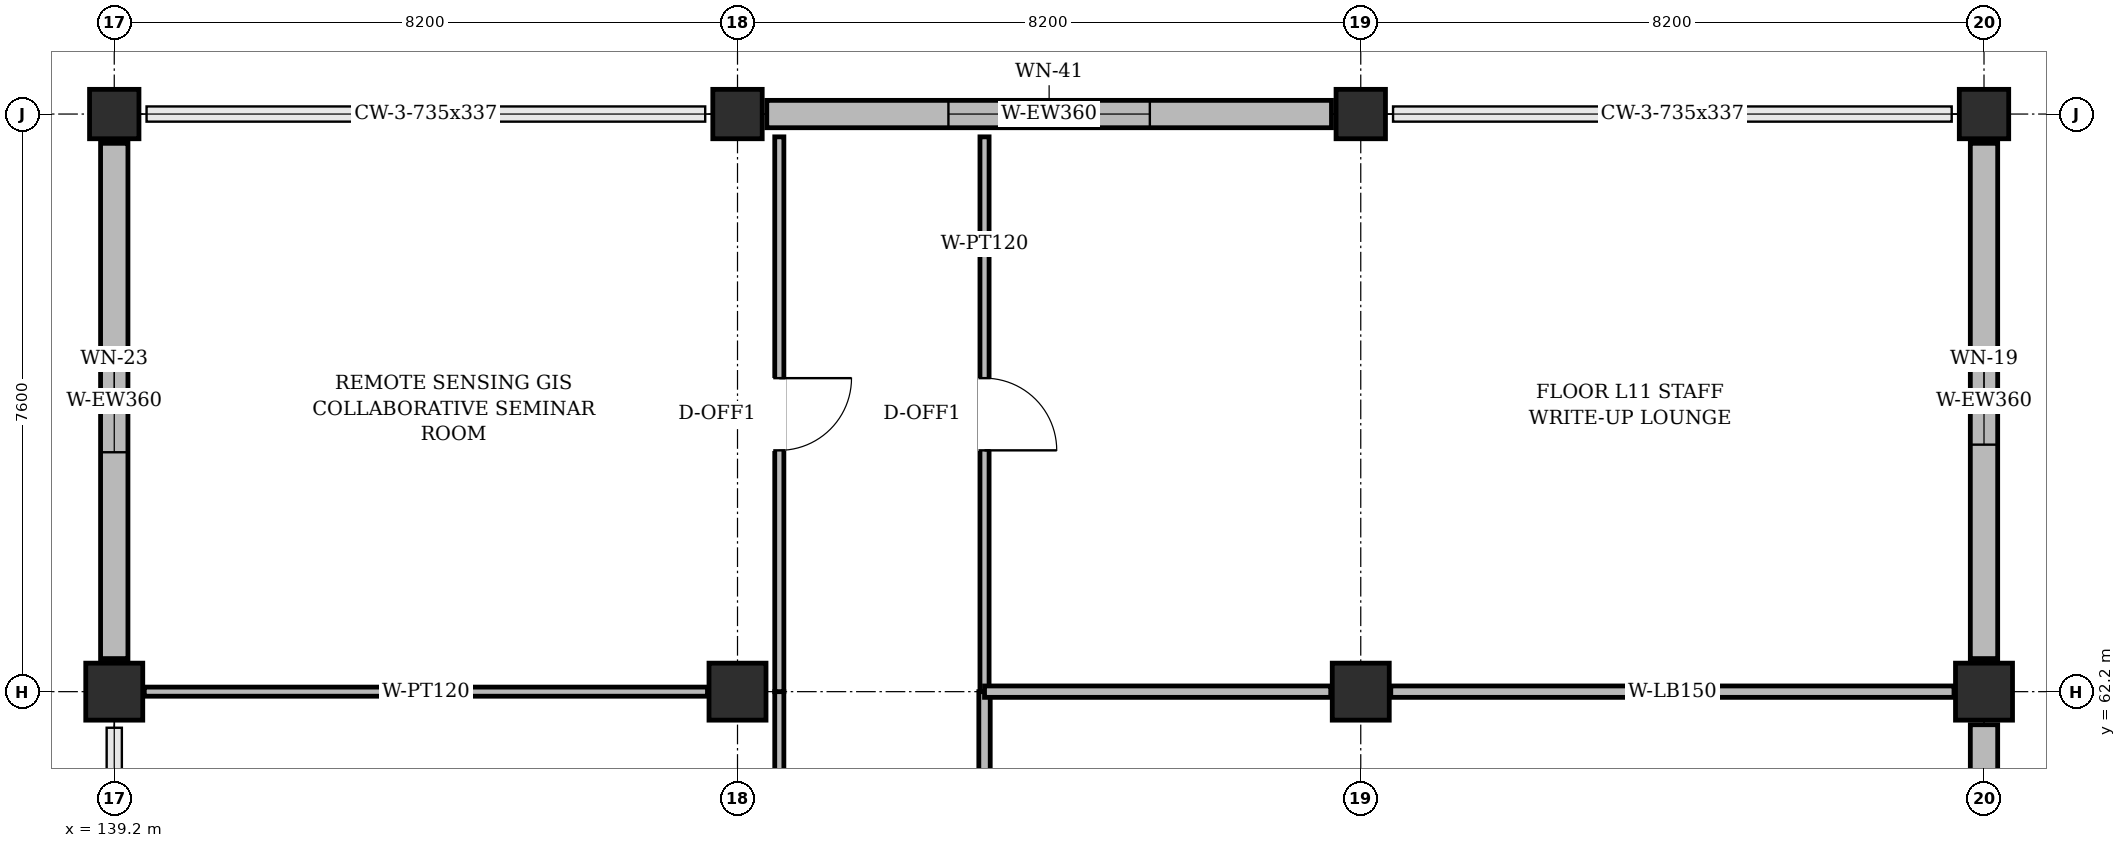
"""IFC4 building model, lengths in metres.
Left out: names, types, materials, properties, quantities, classifications, styles, units other than length and angle.
Written with IfcOpenShell. Run it as: python <this file> out.ifc"""

import sys

from ifc_helpers import new_model, si_unit, direction, frame, frame_2d, origin, origin_2d, place, context, subcontext, project, spatial, rectangle, extrude, element, fill, save


model = new_model("IFC4")
c1 = context("Model", 3, precision=1e-05, world=origin(), true_north=direction((0.0, 1.0)))
c2 = subcontext(c1, "Body", "Model", "MODEL_VIEW")
j1 = project(units=[si_unit("LENGTHUNIT", "METRE"), si_unit("PLANEANGLEUNIT", "RADIAN")], contexts=[c1])
p1 = place(None, origin())
s1 = spatial("IfcSite", under=j1, at=p1, CompositionType="ELEMENT")
p2 = place(p1, origin())
s2 = spatial("IfcBuilding", under=s1, at=p2, CompositionType="ELEMENT")
p3 = place(p2, frame((0.0, 0.0, 49.2)))
s3 = spatial("IfcBuildingStorey", under=s2, at=p3, CompositionType="ELEMENT", Elevation=49.2)
p4 = place(p3, frame((139.2, 62.2, 0.0), z_axis=(0.0, 0.0, 1.0), x_axis=(1.0, 0.0, 0.0)))
e1 = element("IfcColumn", 1, at=p4, inside=s3, PredefinedType="COLUMN", context=c2, shape_type="SweptSolid", body=[
    extrude(rectangle(XDim=0.75, YDim=0.75, at=origin_2d()), origin(), (0.0, 0.0, 1.0), 3.97),
])
p5 = place(p3, frame((139.2, 69.8, 0.0), z_axis=(0.0, 0.0, 1.0), x_axis=(1.0, 0.0, 0.0)))
e2 = element("IfcColumn", 2, at=p5, inside=s3, PredefinedType="COLUMN", context=c2, shape_type="SweptSolid", body=[
    extrude(rectangle(XDim=0.65, YDim=0.65, at=origin_2d()), origin(), (0.0, 0.0, 1.0), 3.97),
])
p6 = place(p3, frame((147.4, 62.2, 0.0), z_axis=(0.0, 0.0, 1.0), x_axis=(1.0, 0.0, 0.0)))
e3 = element("IfcColumn", 3, at=p6, inside=s3, PredefinedType="COLUMN", context=c2, shape_type="SweptSolid", body=[
    extrude(rectangle(XDim=0.75, YDim=0.75, at=origin_2d()), origin(), (0.0, 0.0, 1.0), 3.97),
])
p7 = place(p3, frame((147.4, 69.8, 0.0), z_axis=(0.0, 0.0, 1.0), x_axis=(1.0, 0.0, 0.0)))
e4 = element("IfcColumn", 4, at=p7, inside=s3, PredefinedType="COLUMN", context=c2, shape_type="SweptSolid", body=[
    extrude(rectangle(XDim=0.65, YDim=0.65, at=origin_2d()), origin(), (0.0, 0.0, 1.0), 3.97),
])
p8 = place(p3, frame((155.6, 62.2, 0.0), z_axis=(0.0, 0.0, 1.0), x_axis=(1.0, 0.0, 0.0)))
e5 = element("IfcColumn", 5, at=p8, inside=s3, PredefinedType="COLUMN", context=c2, shape_type="SweptSolid", body=[
    extrude(rectangle(XDim=0.75, YDim=0.75, at=origin_2d()), origin(), (0.0, 0.0, 1.0), 3.97),
])
p9 = place(p3, frame((155.6, 69.8, 0.0), z_axis=(0.0, 0.0, 1.0), x_axis=(1.0, 0.0, 0.0)))
e6 = element("IfcColumn", 6, at=p9, inside=s3, PredefinedType="COLUMN", context=c2, shape_type="SweptSolid", body=[
    extrude(rectangle(XDim=0.65, YDim=0.65, at=origin_2d()), origin(), (0.0, 0.0, 1.0), 3.97),
])
p10 = place(p3, frame((163.8, 62.2, 0.0), z_axis=(0.0, 0.0, 1.0), x_axis=(1.0, 0.0, 0.0)))
e7 = element("IfcColumn", 7, at=p10, inside=s3, PredefinedType="COLUMN", context=c2, shape_type="SweptSolid", body=[
    extrude(rectangle(XDim=0.75, YDim=0.75, at=origin_2d()), origin(), (0.0, 0.0, 1.0), 3.97),
])
p11 = place(p3, frame((163.8, 69.8, 0.0), z_axis=(0.0, 0.0, 1.0), x_axis=(1.0, 0.0, 0.0)))
e8 = element("IfcColumn", 8, at=p11, inside=s3, PredefinedType="COLUMN", context=c2, shape_type="SweptSolid", body=[
    extrude(rectangle(XDim=0.65, YDim=0.65, at=origin_2d()), origin(), (0.0, 0.0, 1.0), 3.945),
])
p12 = place(p3, frame((163.8, 55.035, 0.0), z_axis=(0.0, 0.0, 1.0), x_axis=(0.0, 1.0, 0.0)))
e9 = element("IfcWall", 9, at=p12, inside=s3, PredefinedType="SOLIDWALL", context=c2, shape_type="SweptSolid", body=[
    extrude(rectangle(XDim=6.73, YDim=0.36, at=frame_2d((3.365, 0.0))), origin(), (0.0, 0.0, 1.0), 3.33),
])
p13 = place(p12, frame((2.89, 0.0, 0.95)))
e10 = element("IfcOpeningElement", 10, at=p13, cuts=e9, PredefinedType="OPENING", context=c2, shape_type="SweptSolid", body=[
    extrude(rectangle(XDim=0.95, YDim=2.05, at=frame_2d((0.475, 1.025))), frame((0.0, 0.192, 0.0), z_axis=(0.0, -1.0, 0.0), x_axis=(1.0, 0.0, 0.0)), (0.0, 0.0, 1.0), 0.384),
])
p14 = place(p3, frame((163.8, 62.635, 0.0), z_axis=(0.0, 0.0, 1.0), x_axis=(0.0, 1.0, 0.0)))
e11 = element("IfcWall", 11, at=p14, inside=s3, PredefinedType="SOLIDWALL", context=c2, shape_type="SweptSolid", body=[
    extrude(rectangle(XDim=6.78, YDim=0.36, at=frame_2d((3.39, 0.0))), origin(), (0.0, 0.0, 1.0), 3.355),
])
p15 = place(p14, frame((2.815, 0.0, 0.95)))
e12 = element("IfcOpeningElement", 12, at=p15, cuts=e11, PredefinedType="OPENING", context=c2, shape_type="SweptSolid", body=[
    extrude(rectangle(XDim=1.15, YDim=1.75, at=frame_2d((0.575, 0.875))), frame((0.0, 0.192, 0.0), z_axis=(0.0, -1.0, 0.0), x_axis=(1.0, 0.0, 0.0)), (0.0, 0.0, 1.0), 0.384),
])
p16 = place(p3, frame((155.215, 69.8, 0.0), z_axis=(0.0, 0.0, 1.0), x_axis=(-1.0, 0.0, 0.0)))
e13 = element("IfcWall", 13, at=p16, inside=s3, PredefinedType="SOLIDWALL", context=c2, shape_type="SweptSolid", body=[
    extrude(rectangle(XDim=7.43, YDim=0.36, at=frame_2d((3.715, 0.0))), origin(), (0.0, 0.0, 1.0), 3.355),
])
p17 = place(p16, frame((2.39, 0.0, 0.95)))
e14 = element("IfcOpeningElement", 14, at=p17, cuts=e13, PredefinedType="OPENING", context=c2, shape_type="SweptSolid", body=[
    extrude(rectangle(XDim=2.65, YDim=1.25, at=frame_2d((1.325, 0.625))), frame((0.0, 0.192, 0.0), z_axis=(0.0, -1.0, 0.0), x_axis=(1.0, 0.0, 0.0)), (0.0, 0.0, 1.0), 0.384),
])
p18 = place(p3, frame((139.2, 69.415, 0.0), z_axis=(0.0, 0.0, 1.0), x_axis=(0.0, -1.0, 0.0)))
e15 = element("IfcWall", 15, at=p18, inside=s3, PredefinedType="SOLIDWALL", context=c2, shape_type="SweptSolid", body=[
    extrude(rectangle(XDim=6.78, YDim=0.36, at=frame_2d((3.39, 0.0))), origin(), (0.0, 0.0, 1.0), 3.355),
])
p19 = place(p18, frame((2.715, 0.0, 0.95)))
e16 = element("IfcOpeningElement", 16, at=p19, cuts=e15, PredefinedType="OPENING", context=c2, shape_type="SweptSolid", body=[
    extrude(rectangle(XDim=1.35, YDim=1.75, at=frame_2d((0.675, 0.875))), frame((0.0, 0.192, 0.0), z_axis=(0.0, -1.0, 0.0), x_axis=(1.0, 0.0, 0.0)), (0.0, 0.0, 1.0), 0.384),
])
p20 = place(p3, frame((150.65, 62.2, 0.0), z_axis=(0.0, 0.0, 1.0), x_axis=(0.0, -1.0, 0.0)))
e17 = element("IfcWall", 17, at=p20, inside=s3, PredefinedType="PARTITIONING", context=c2, shape_type="SweptSolid", body=[
    extrude(rectangle(XDim=25.95, YDim=0.15, at=frame_2d((12.975, 0.0))), origin(), (0.0, 0.0, 1.0), 3.805),
])
p21 = place(p20, frame((12.275, 0.0, 0.0)))
e18 = element("IfcOpeningElement", 18, at=p21, cuts=e17, PredefinedType="OPENING", context=c2, shape_type="SweptSolid", body=[
    extrude(rectangle(XDim=1.4, YDim=2.2, at=frame_2d((0.7, 1.1))), frame((0.0, 0.087, 0.0), z_axis=(0.0, -1.0, 0.0), x_axis=(1.0, 0.0, 0.0)), (0.0, 0.0, 1.0), 0.174),
])
p22 = place(p3, frame((147.95, 46.51, 0.0), z_axis=(0.0, 0.0, 1.0), x_axis=(0.0, 1.0, 0.0)))
e19 = element("IfcWall", 19, at=p22, inside=s3, PredefinedType="PARTITIONING", context=c2, shape_type="SweptSolid", body=[
    extrude(rectangle(XDim=15.69, YDim=0.12, at=frame_2d((7.845, 0.0))), origin(), (0.0, 0.0, 1.0), 3.805),
])
p23 = place(p22, frame((6.443, 0.0, 0.0)))
e20 = element("IfcOpeningElement", 20, at=p23, cuts=e19, PredefinedType="OPENING", context=c2, shape_type="SweptSolid", body=[
    extrude(rectangle(XDim=1.05, YDim=2.2, at=frame_2d((0.525, 1.1))), frame((0.0, 0.072, 0.0), z_axis=(0.0, -1.0, 0.0), x_axis=(1.0, 0.0, 0.0)), (0.0, 0.0, 1.0), 0.144),
])
p24 = place(p3, frame((147.95, 62.2, 0.0), z_axis=(0.0, 0.0, 1.0), x_axis=(0.0, 1.0, 0.0)))
e21 = element("IfcWall", 21, at=p24, inside=s3, PredefinedType="PARTITIONING", context=c2, shape_type="SweptSolid", body=[
    extrude(rectangle(XDim=7.3, YDim=0.12, at=frame_2d((3.65, 0.0))), origin(), (0.0, 0.0, 1.0), 3.805),
])
p25 = place(p24, frame((3.175, 0.0, 0.0)))
e22 = element("IfcOpeningElement", 22, at=p25, cuts=e21, PredefinedType="OPENING", context=c2, shape_type="SweptSolid", body=[
    extrude(rectangle(XDim=0.95, YDim=2.2, at=frame_2d((0.475, 1.1))), frame((0.0, 0.072, 0.0), z_axis=(0.0, -1.0, 0.0), x_axis=(1.0, 0.0, 0.0)), (0.0, 0.0, 1.0), 0.144),
])
p26 = place(p3, frame((150.65, 69.5, 0.0), z_axis=(0.0, 0.0, 1.0), x_axis=(0.0, -1.0, 0.0)))
e23 = element("IfcWall", 23, at=p26, inside=s3, PredefinedType="PARTITIONING", context=c2, shape_type="SweptSolid", body=[
    extrude(rectangle(XDim=7.3, YDim=0.12, at=frame_2d((3.65, 0.0))), origin(), (0.0, 0.0, 1.0), 3.805),
])
p27 = place(p26, frame((3.175, 0.0, 0.0)))
e24 = element("IfcOpeningElement", 24, at=p27, cuts=e23, PredefinedType="OPENING", context=c2, shape_type="SweptSolid", body=[
    extrude(rectangle(XDim=0.95, YDim=2.2, at=frame_2d((0.475, 1.1))), frame((0.0, 0.072, 0.0), z_axis=(0.0, -1.0, 0.0), x_axis=(1.0, 0.0, 0.0)), (0.0, 0.0, 1.0), 0.144),
])
p28 = place(p3, frame((150.65, 62.2, 0.0), z_axis=(0.0, 0.0, 1.0), x_axis=(1.0, 0.0, 0.0)))
e25 = element("IfcWall", 25, at=p28, inside=s3, PredefinedType="PARTITIONING", context=c2, shape_type="SweptSolid", body=[
    extrude(rectangle(XDim=4.555, YDim=0.15, at=frame_2d((2.278, 0.0))), origin(), (0.0, 0.0, 1.0), 3.305),
])
p29 = place(p3, frame((155.995, 62.2, 0.0), z_axis=(0.0, 0.0, 1.0), x_axis=(1.0, 0.0, 0.0)))
e26 = element("IfcWall", 26, at=p29, inside=s3, PredefinedType="PARTITIONING", context=c2, shape_type="SweptSolid", body=[
    extrude(rectangle(XDim=7.41, YDim=0.15, at=frame_2d((3.705, 0.0))), origin(), (0.0, 0.0, 1.0), 3.305),
])
p30 = place(p3, frame((139.595, 62.2, 0.0), z_axis=(0.0, 0.0, 1.0), x_axis=(1.0, 0.0, 0.0)))
e27 = element("IfcWall", 27, at=p30, inside=s3, PredefinedType="PARTITIONING", context=c2, shape_type="SweptSolid", body=[
    extrude(rectangle(XDim=7.41, YDim=0.12, at=frame_2d((3.705, 0.0))), origin(), (0.0, 0.0, 1.0), 3.305),
])
p31 = place(p15, origin())
e28 = element("IfcWindow", 28, at=p31, inside=s3, PartitioningType="SINGLE_PANEL", PredefinedType="WINDOW", context=c2, shape_type="SweptSolid", body=[
    extrude(rectangle(XDim=1.15, YDim=1.75, at=frame_2d((0.575, 0.875))), frame((0.0, 0.03, 0.0), z_axis=(0.0, -1.0, 0.0), x_axis=(1.0, 0.0, 0.0)), (0.0, 0.0, 1.0), 0.06),
])
fill(e12, e28)
p32 = place(p17, origin())
e29 = element("IfcWindow", 29, at=p32, inside=s3, PartitioningType="DOUBLE_PANEL_VERTICAL", PredefinedType="WINDOW", context=c2, shape_type="SweptSolid", body=[
    extrude(rectangle(XDim=2.65, YDim=1.25, at=frame_2d((1.325, 0.625))), frame((0.0, 0.03, 0.0), z_axis=(0.0, -1.0, 0.0), x_axis=(1.0, 0.0, 0.0)), (0.0, 0.0, 1.0), 0.06),
])
fill(e14, e29)
p33 = place(p19, origin())
e30 = element("IfcWindow", 30, at=p33, inside=s3, PartitioningType="SINGLE_PANEL", PredefinedType="WINDOW", context=c2, shape_type="SweptSolid", body=[
    extrude(rectangle(XDim=1.35, YDim=1.75, at=frame_2d((0.675, 0.875))), frame((0.0, 0.03, 0.0), z_axis=(0.0, -1.0, 0.0), x_axis=(1.0, 0.0, 0.0)), (0.0, 0.0, 1.0), 0.06),
])
fill(e16, e30)
p34 = place(p25, frame((0.95, 0.0, 0.0), z_axis=(0.0, 0.0, 1.0), x_axis=(-1.0, 0.0, 0.0)))
e31 = element("IfcDoor", 31, at=p34, inside=s3, OperationType="SINGLE_SWING_LEFT", PredefinedType="DOOR", context=c2, shape_type="SweptSolid", body=[
    extrude(rectangle(XDim=0.95, YDim=2.2, at=frame_2d((0.475, 1.1))), frame((0.0, 0.025, 0.0), z_axis=(0.0, -1.0, 0.0), x_axis=(1.0, 0.0, 0.0)), (0.0, 0.0, 1.0), 0.05),
])
fill(e22, e31)
p35 = place(p27, origin())
e32 = element("IfcDoor", 32, at=p35, inside=s3, OperationType="SINGLE_SWING_RIGHT", PredefinedType="DOOR", context=c2, shape_type="SweptSolid", body=[
    extrude(rectangle(XDim=0.95, YDim=2.2, at=frame_2d((0.475, 1.1))), frame((0.0, 0.025, 0.0), z_axis=(0.0, -1.0, 0.0), x_axis=(1.0, 0.0, 0.0)), (0.0, 0.0, 1.0), 0.05),
])
fill(e24, e32)
save(model, sys.argv[1])
